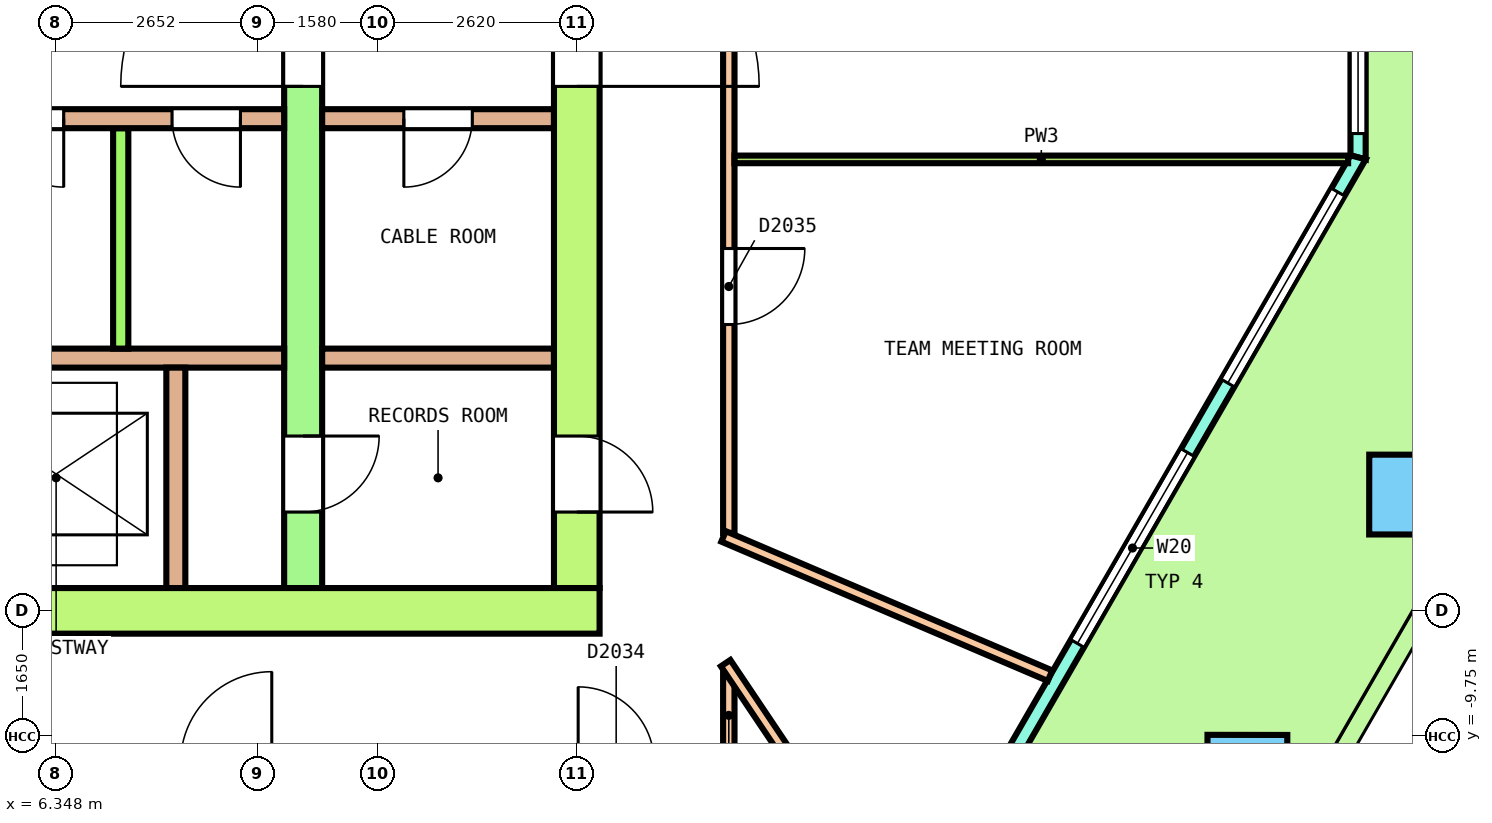
"""IFC4 building model, lengths in metres.
Left out: names, types, materials, properties, quantities, classifications, styles, units other than length and angle.
Written with IfcOpenShell. Run it as: python <this file> out.ifc"""

import sys

from ifc_helpers import new_model, si_unit, direction, frame, frame_2d, origin, origin_2d, place, context, subcontext, project, spatial, polyline, rectangle, outline, extrude, element, fill, save


model = new_model("IFC4")
c1 = context("Model", 3, precision=1e-05, world=origin(), true_north=direction((0.0, 1.0)))
c2 = subcontext(c1, "Body", "Model", "MODEL_VIEW")
j1 = project(units=[si_unit("LENGTHUNIT", "METRE"), si_unit("PLANEANGLEUNIT", "RADIAN")], contexts=[c1])
p1 = place(None, origin())
s1 = spatial("IfcSite", under=j1, at=p1, CompositionType="ELEMENT")
p2 = place(p1, origin())
s2 = spatial("IfcBuilding", under=s1, at=p2, CompositionType="ELEMENT")
p3 = place(p2, frame((0.0, 0.0, 241.4)))
s3 = spatial("IfcBuildingStorey", under=s2, at=p3, CompositionType="ELEMENT", Elevation=241.4)
p4 = place(p3, frame((22.022, -10.257, 0.0), z_axis=(0.003611703602, 0.006287039604, 0.99997371402), x_axis=(0.499382074229, 0.866351529566, -0.007250597003)))
e1 = element("IfcColumn", 1, at=p4, inside=s3, PredefinedType="COLUMN", context=c2, shape_type="SweptSolid", body=[
    extrude(rectangle(XDim=1.05, YDim=1.05, at=origin_2d()), origin(), (0.0, 0.0, 1.0), 3.65),
])
p5 = place(p3, frame((24.15, -6.57, 0.0), z_axis=(0.010899694483, 0.018857140148, 0.999762774325), x_axis=(0.501085789903, 0.865123480471, -0.021780603655)))
e2 = element("IfcColumn", 2, at=p5, inside=s3, PredefinedType="COLUMN", context=c2, shape_type="SweptSolid", body=[
    extrude(rectangle(XDim=1.05, YDim=1.05, at=origin_2d()), origin(), (0.0, 0.0, 1.0), 3.651),
])
p6 = place(p3, frame((23.479, -2.134, 0.0), z_axis=(0.0, 0.0, 1.0), x_axis=(0.0, 1.0, 0.0)))
e3 = element("IfcWall", 3, at=p6, inside=s3, PredefinedType="SOLIDWALL", context=c2, shape_type="SweptSolid", body=[
    extrude(outline(polyline([(-0.027, -0.1), (1.008, -0.1), (2.042, -0.1), (3.077, -0.1), (4.111, -0.1), (5.146, -0.1), (6.18, -0.1), (6.126, 0.1), (5.11, 0.1), (4.093, 0.1), (3.077, 0.1), (2.06, 0.1), (1.043, 0.1), (0.027, 0.1), (-0.027, -0.1)])), origin(), (0.0, 0.0, 1.0), 3.7),
])
p7 = place(p6, frame((0.313, 0.0, 0.1)))
e4 = element("IfcOpeningElement", 4, at=p7, cuts=e3, PredefinedType="OPENING", context=c2, shape_type="SweptSolid", body=[
    extrude(rectangle(XDim=2.45, YDim=2.65, at=frame_2d((1.225, 1.325))), frame((0.0, 0.11, 0.0), z_axis=(0.0, -1.0, 0.0), x_axis=(1.0, 0.0, 0.0)), (0.0, 0.0, 1.0), 0.22),
])
p8 = place(p6, frame((3.39, 0.0, 0.1)))
e5 = element("IfcOpeningElement", 5, at=p8, cuts=e3, PredefinedType="OPENING", context=c2, shape_type="SweptSolid", body=[
    extrude(rectangle(XDim=2.45, YDim=2.65, at=frame_2d((1.225, 1.325))), frame((0.0, 0.11, 0.0), z_axis=(0.0, -1.0, 0.0), x_axis=(1.0, 0.0, 0.0)), (0.0, 0.0, 1.0), 0.22),
])
p9 = place(p3, frame((13.587, -19.266, 0.0), z_axis=(0.0, 0.0, 1.0), x_axis=(0.500004117472, 0.866023026548, 0.0)))
e6 = element("IfcWall", 6, at=p9, inside=s3, PredefinedType="SOLIDWALL", context=c2, shape_type="SweptSolid", body=[
    extrude(outline(polyline([(-0.027, -0.1), (1.017, -0.1), (2.061, -0.1), (3.105, -0.1), (4.149, -0.1), (5.193, -0.1), (6.237, -0.1), (7.281, -0.1), (8.325, -0.1), (9.369, -0.1), (10.414, -0.1), (11.458, -0.1), (12.501, -0.1), (13.546, -0.1), (14.59, -0.1), (15.634, -0.1), (16.678, -0.1), (17.722, -0.1), (18.766, -0.1), (19.81, -0.1), (19.756, 0.1), (18.718, 0.1), (17.679, 0.1), (16.641, 0.1), (15.603, 0.1), (14.564, 0.1), (13.526, 0.1), (12.488, 0.1), (11.449, 0.1), (10.411, 0.1), (9.372, 0.1), (8.334, 0.1), (7.295, 0.1), (6.257, 0.1), (5.219, 0.1), (4.18, 0.1), (3.142, 0.1), (2.104, 0.1), (1.065, 0.1), (0.027, 0.1), (-0.027, -0.1)])), origin(), (0.0, 0.0, 1.0), 3.7),
])
p10 = place(p9, frame((0.528, 0.0, 0.1)))
e7 = element("IfcOpeningElement", 7, at=p10, cuts=e6, PredefinedType="OPENING", context=c2, shape_type="SweptSolid", body=[
    extrude(rectangle(XDim=2.9, YDim=2.65, at=frame_2d((1.45, 1.325))), frame((0.0, 0.11, 0.0), z_axis=(0.0, -1.0, 0.0), x_axis=(1.0, 0.0, 0.0)), (0.0, 0.0, 1.0), 0.22),
])
p11 = place(p9, frame((4.485, 0.0, 0.1)))
e8 = element("IfcOpeningElement", 8, at=p11, cuts=e6, PredefinedType="OPENING", context=c2, shape_type="SweptSolid", body=[
    extrude(rectangle(XDim=2.9, YDim=2.65, at=frame_2d((1.45, 1.325))), frame((0.0, 0.11, 0.0), z_axis=(0.0, -1.0, 0.0), x_axis=(1.0, 0.0, 0.0)), (0.0, 0.0, 1.0), 0.22),
])
p12 = place(p9, frame((8.991, 0.0, 0.0)))
e9 = element("IfcOpeningElement", 9, at=p12, cuts=e6, PredefinedType="OPENING", context=c2, shape_type="SweptSolid", body=[
    extrude(rectangle(XDim=1.8, YDim=2.4, at=frame_2d((0.9, 1.2))), frame((0.0, 0.11, 0.0), z_axis=(0.0, -1.0, 0.0), x_axis=(1.0, 0.0, 0.0)), (0.0, 0.0, 1.0), 0.22),
])
p13 = place(p9, frame((8.991, 0.0, 2.55)))
e10 = element("IfcOpeningElement", 10, at=p13, cuts=e6, PredefinedType="OPENING", context=c2, shape_type="SweptSolid", body=[
    extrude(rectangle(XDim=1.8, YDim=0.2, at=frame_2d((0.9, 0.1))), frame((0.0, 0.11, 0.0), z_axis=(0.0, -1.0, 0.0), x_axis=(1.0, 0.0, 0.0)), (0.0, 0.0, 1.0), 0.22),
])
p14 = place(p9, frame((12.398, 0.0, 0.1)))
e11 = element("IfcOpeningElement", 11, at=p14, cuts=e6, PredefinedType="OPENING", context=c2, shape_type="SweptSolid", body=[
    extrude(rectangle(XDim=2.9, YDim=2.65, at=frame_2d((1.45, 1.325))), frame((0.0, 0.11, 0.0), z_axis=(0.0, -1.0, 0.0), x_axis=(1.0, 0.0, 0.0)), (0.0, 0.0, 1.0), 0.22),
])
p15 = place(p9, frame((16.355, 0.0, 0.1)))
e12 = element("IfcOpeningElement", 12, at=p15, cuts=e6, PredefinedType="OPENING", context=c2, shape_type="SweptSolid", body=[
    extrude(rectangle(XDim=2.9, YDim=2.65, at=frame_2d((1.45, 1.325))), frame((0.0, 0.11, 0.0), z_axis=(0.0, -1.0, 0.0), x_axis=(1.0, 0.0, 0.0)), (0.0, 0.0, 1.0), 0.22),
])
p16 = place(p3, frame((-13.5, -8.1, 0.0), z_axis=(0.0, 0.0, 1.0), x_axis=(1.0, 0.0, 0.0)))
e13 = element("IfcWall", 13, at=p16, inside=s3, PredefinedType="SHEAR", context=c2, shape_type="SweptSolid", body=[
    extrude(rectangle(XDim=27.0, YDim=0.6, at=frame_2d((13.5, 0.0))), origin(), (0.0, 0.0, 1.0), 3.7),
])
p17 = place(p16, frame((15.05, 0.0, 0.0)))
e14 = element("IfcOpeningElement", 14, at=p17, cuts=e13, PredefinedType="OPENING", context=c2, shape_type="SweptSolid", body=[
    extrude(rectangle(XDim=1.2, YDim=2.1, at=frame_2d((0.6, 1.05))), frame((0.0, 0.31, 0.0), z_axis=(0.0, -1.0, 0.0), x_axis=(1.0, 0.0, 0.0)), (0.0, 0.0, 1.0), 0.62),
])
p18 = place(p3, frame((13.2, -7.8, 0.0), z_axis=(0.0, 0.0, 1.0), x_axis=(0.0, 1.0, 0.0)))
e15 = element("IfcWall", 15, at=p18, inside=s3, PredefinedType="SHEAR", context=c2, shape_type="SweptSolid", body=[
    extrude(rectangle(XDim=15.6, YDim=0.6, at=frame_2d((7.8, 0.0))), origin(), (0.0, 0.0, 1.0), 3.7),
])
p19 = place(p18, frame((6.6, 0.0, 0.0)))
e16 = element("IfcOpeningElement", 16, at=p19, cuts=e15, PredefinedType="OPENING", context=c2, shape_type="SweptSolid", body=[
    extrude(rectangle(XDim=2.4, YDim=2.1, at=frame_2d((1.2, 1.05))), frame((0.0, 0.31, 0.0), z_axis=(0.0, -1.0, 0.0), x_axis=(1.0, 0.0, 0.0)), (0.0, 0.0, 1.0), 0.62),
])
p20 = place(p18, frame((13.5, 0.0, 0.0)))
e17 = element("IfcOpeningElement", 17, at=p20, cuts=e15, PredefinedType="OPENING", context=c2, shape_type="SweptSolid", body=[
    extrude(rectangle(XDim=1.2, YDim=2.1, at=frame_2d((0.6, 1.05))), frame((0.0, 0.31, 0.0), z_axis=(0.0, -1.0, 0.0), x_axis=(1.0, 0.0, 0.0)), (0.0, 0.0, 1.0), 0.62),
])
p21 = place(p18, frame((1.0, 0.0, 0.0)))
e18 = element("IfcOpeningElement", 18, at=p21, cuts=e15, PredefinedType="OPENING", context=c2, shape_type="SweptSolid", body=[
    extrude(rectangle(XDim=1.0, YDim=2.1, at=frame_2d((0.5, 1.05))), frame((0.0, 0.31, 0.0), z_axis=(0.0, -1.0, 0.0), x_axis=(1.0, 0.0, 0.0)), (0.0, 0.0, 1.0), 0.62),
])
p22 = place(p3, frame((9.6, -7.8, 0.0), z_axis=(0.0, 0.0, 1.0), x_axis=(0.0, 1.0, 0.0)))
e19 = element("IfcWall", 19, at=p22, inside=s3, PredefinedType="SHEAR", context=c2, shape_type="SweptSolid", body=[
    extrude(rectangle(XDim=15.6, YDim=0.5, at=frame_2d((7.8, 0.0))), origin(), (0.0, 0.0, 1.0), 3.7),
])
p23 = place(p22, frame((6.6, 0.0, 0.0)))
e20 = element("IfcOpeningElement", 20, at=p23, cuts=e19, PredefinedType="OPENING", context=c2, shape_type="SweptSolid", body=[
    extrude(rectangle(XDim=2.4, YDim=2.1, at=frame_2d((1.2, 1.05))), frame((0.0, 0.26, 0.0), z_axis=(0.0, -1.0, 0.0), x_axis=(1.0, 0.0, 0.0)), (0.0, 0.0, 1.0), 0.52),
])
p24 = place(p22, frame((13.5, 0.0, 0.0)))
e21 = element("IfcOpeningElement", 21, at=p24, cuts=e19, PredefinedType="OPENING", context=c2, shape_type="SweptSolid", body=[
    extrude(rectangle(XDim=1.2, YDim=2.1, at=frame_2d((0.6, 1.05))), frame((0.0, 0.26, 0.0), z_axis=(0.0, -1.0, 0.0), x_axis=(1.0, 0.0, 0.0)), (0.0, 0.0, 1.0), 0.52),
])
p25 = place(p22, frame((1.0, 0.0, 0.0)))
e22 = element("IfcOpeningElement", 22, at=p25, cuts=e19, PredefinedType="OPENING", context=c2, shape_type="SweptSolid", body=[
    extrude(rectangle(XDim=1.0, YDim=2.1, at=frame_2d((0.5, 1.05))), frame((0.0, 0.26, 0.0), z_axis=(0.0, -1.0, 0.0), x_axis=(1.0, 0.0, 0.0)), (0.0, 0.0, 1.0), 0.52),
])
p26 = place(p3, frame((-9.35, -1.625, 0.0), z_axis=(0.0, 0.0, 1.0), x_axis=(1.0, 0.0, 0.0)))
e23 = element("IfcWall", 23, at=p26, inside=s3, PredefinedType="SOLIDWALL", context=c2, shape_type="SweptSolid", body=[
    extrude(rectangle(XDim=18.7, YDim=0.25, at=frame_2d((9.35, 0.0))), origin(), (0.0, 0.0, 1.0), 3.7),
])
p27 = place(p26, frame((7.65, 0.0, 0.0)))
e24 = element("IfcOpeningElement", 24, at=p27, cuts=e23, PredefinedType="OPENING", context=c2, shape_type="SweptSolid", body=[
    extrude(rectangle(XDim=1.1, YDim=2.1, at=frame_2d((0.55, 1.05))), frame((0.0, 0.135, 0.0), z_axis=(0.0, -1.0, 0.0), x_axis=(1.0, 0.0, 0.0)), (0.0, 0.0, 1.0), 0.27),
])
p28 = place(p26, frame((9.95, 0.0, 0.0)))
e25 = element("IfcOpeningElement", 25, at=p28, cuts=e23, PredefinedType="OPENING", context=c2, shape_type="SweptSolid", body=[
    extrude(rectangle(XDim=1.1, YDim=2.1, at=frame_2d((0.55, 1.05))), frame((0.0, 0.135, 0.0), z_axis=(0.0, -1.0, 0.0), x_axis=(1.0, 0.0, 0.0)), (0.0, 0.0, 1.0), 0.27),
])
p29 = place(p26, frame((12.4, 0.0, 0.0)))
e26 = element("IfcOpeningElement", 26, at=p29, cuts=e23, PredefinedType="OPENING", context=c2, shape_type="SweptSolid", body=[
    extrude(rectangle(XDim=1.1, YDim=2.1, at=frame_2d((0.55, 1.05))), frame((0.0, 0.135, 0.0), z_axis=(0.0, -1.0, 0.0), x_axis=(1.0, 0.0, 0.0)), (0.0, 0.0, 1.0), 0.27),
])
p30 = place(p26, frame((0.575, 0.0, 0.0)))
e27 = element("IfcOpeningElement", 27, at=p30, cuts=e23, PredefinedType="OPENING", context=c2, shape_type="SweptSolid", body=[
    extrude(rectangle(XDim=0.9, YDim=2.1, at=frame_2d((0.45, 1.05))), frame((0.0, 0.135, 0.0), z_axis=(0.0, -1.0, 0.0), x_axis=(1.0, 0.0, 0.0)), (0.0, 0.0, 1.0), 0.27),
])
p31 = place(p26, frame((2.519, 0.0, 0.0)))
e28 = element("IfcOpeningElement", 28, at=p31, cuts=e23, PredefinedType="OPENING", context=c2, shape_type="SweptSolid", body=[
    extrude(rectangle(XDim=0.9, YDim=2.1, at=frame_2d((0.45, 1.05))), frame((0.0, 0.135, 0.0), z_axis=(0.0, -1.0, 0.0), x_axis=(1.0, 0.0, 0.0)), (0.0, 0.0, 1.0), 0.27),
])
p32 = place(p26, frame((4.881, 0.0, 0.0)))
e29 = element("IfcOpeningElement", 29, at=p32, cuts=e23, PredefinedType="OPENING", context=c2, shape_type="SweptSolid", body=[
    extrude(rectangle(XDim=0.9, YDim=2.1, at=frame_2d((0.45, 1.05))), frame((0.0, 0.135, 0.0), z_axis=(0.0, -1.0, 0.0), x_axis=(1.0, 0.0, 0.0)), (0.0, 0.0, 1.0), 0.27),
])
p33 = place(p26, frame((14.9, 0.0, 0.0)))
e30 = element("IfcOpeningElement", 30, at=p33, cuts=e23, PredefinedType="OPENING", context=c2, shape_type="SweptSolid", body=[
    extrude(rectangle(XDim=0.9, YDim=2.1, at=frame_2d((0.45, 1.05))), frame((0.0, 0.135, 0.0), z_axis=(0.0, -1.0, 0.0), x_axis=(1.0, 0.0, 0.0)), (0.0, 0.0, 1.0), 0.27),
])
p34 = place(p26, frame((17.225, 0.0, 0.0)))
e31 = element("IfcOpeningElement", 31, at=p34, cuts=e23, PredefinedType="OPENING", context=c2, shape_type="SweptSolid", body=[
    extrude(rectangle(XDim=0.9, YDim=2.1, at=frame_2d((0.45, 1.05))), frame((0.0, 0.135, 0.0), z_axis=(0.0, -1.0, 0.0), x_axis=(1.0, 0.0, 0.0)), (0.0, 0.0, 1.0), 0.27),
])
p35 = place(p3, frame((9.85, -1.625, 0.0), z_axis=(0.0, 0.0, 1.0), x_axis=(1.0, 0.0, 0.0)))
e32 = element("IfcWall", 32, at=p35, inside=s3, PredefinedType="SOLIDWALL", context=c2, shape_type="SweptSolid", body=[
    extrude(rectangle(XDim=3.05, YDim=0.25, at=frame_2d((1.525, 0.0))), origin(), (0.0, 0.0, 1.0), 3.7),
])
p36 = place(p35, frame((1.075, 0.0, 0.0)))
e33 = element("IfcOpeningElement", 33, at=p36, cuts=e32, PredefinedType="OPENING", context=c2, shape_type="SweptSolid", body=[
    extrude(rectangle(XDim=0.9, YDim=2.1, at=frame_2d((0.45, 1.05))), frame((0.0, 0.135, 0.0), z_axis=(0.0, -1.0, 0.0), x_axis=(1.0, 0.0, 0.0)), (0.0, 0.0, 1.0), 0.27),
])
p37 = place(p3, frame((-9.35, -4.775, 0.0), z_axis=(0.0, 0.0, 1.0), x_axis=(1.0, 0.0, 0.0)))
e34 = element("IfcWall", 34, at=p37, inside=s3, PredefinedType="SOLIDWALL", context=c2, shape_type="SweptSolid", body=[
    extrude(rectangle(XDim=18.7, YDim=0.25, at=frame_2d((9.35, 0.0))), origin(), (0.0, 0.0, 1.0), 3.7),
])
p38 = place(p3, frame((9.85, -4.775, 0.0), z_axis=(0.0, 0.0, 1.0), x_axis=(1.0, 0.0, 0.0)))
e35 = element("IfcWall", 35, at=p38, inside=s3, PredefinedType="SOLIDWALL", context=c2, shape_type="SweptSolid", body=[
    extrude(rectangle(XDim=3.05, YDim=0.25, at=frame_2d((1.525, 0.0))), origin(), (0.0, 0.0, 1.0), 3.7),
])
p39 = place(p3, frame((7.2, -4.65, 0.0), z_axis=(0.0, 0.0, 1.0), x_axis=(0.0, 1.0, 0.0)))
e36 = element("IfcWall", 36, at=p39, inside=s3, PredefinedType="SOLIDWALL", context=c2, shape_type="SweptSolid", body=[
    extrude(rectangle(XDim=2.9, YDim=0.2, at=frame_2d((1.45, 0.0))), origin(), (0.0, 0.0, 1.0), 3.7),
])
p40 = place(p3, frame((7.925, -7.8, 0.0), z_axis=(0.0, 0.0, 1.0), x_axis=(0.0, 1.0, 0.0)))
e37 = element("IfcWall", 37, at=p40, inside=s3, PredefinedType="SOLIDWALL", context=c2, shape_type="SweptSolid", body=[
    extrude(rectangle(XDim=2.9, YDim=0.25, at=frame_2d((1.45, 0.0))), origin(), (0.0, 0.0, 1.0), 3.7),
])
p41 = place(p3, frame((15.2, -10.025, 0.0), z_axis=(0.0, 0.0, 1.0), x_axis=(0.0, 1.0, 0.0)))
e38 = element("IfcWall", 38, at=p41, inside=s3, PredefinedType="PARTITIONING", context=c2, shape_type="SweptSolid", body=[
    extrude(rectangle(XDim=1.1, YDim=0.15, at=frame_2d((0.55, 0.0))), origin(), (0.0, 0.0, 1.0), 3.7),
])
p42 = place(p3, frame((15.2, -7.075, 0.0), z_axis=(0.0, 0.0, 1.0), x_axis=(0.0, 1.0, 0.0)))
e39 = element("IfcWall", 39, at=p42, inside=s3, PredefinedType="PARTITIONING", context=c2, shape_type="SweptSolid", body=[
    extrude(rectangle(XDim=17.1, YDim=0.15, at=frame_2d((8.55, 0.0))), origin(), (0.0, 0.0, 1.0), 2.8),
])
p43 = place(p42, frame((7.418, 0.0, 0.0)))
e40 = element("IfcOpeningElement", 40, at=p43, cuts=e39, PredefinedType="OPENING", context=c2, shape_type="SweptSolid", body=[
    extrude(rectangle(XDim=1.2, YDim=2.1, at=frame_2d((0.6, 1.05))), frame((0.0, 0.085, 0.0), z_axis=(0.0, -1.0, 0.0), x_axis=(1.0, 0.0, 0.0)), (0.0, 0.0, 1.0), 0.17),
])
p44 = place(p42, frame((12.815, 0.0, 0.0)))
e41 = element("IfcOpeningElement", 41, at=p44, cuts=e39, PredefinedType="OPENING", context=c2, shape_type="SweptSolid", body=[
    extrude(rectangle(XDim=1.2, YDim=2.1, at=frame_2d((0.6, 1.05))), frame((0.0, 0.085, 0.0), z_axis=(0.0, -1.0, 0.0), x_axis=(1.0, 0.0, 0.0)), (0.0, 0.0, 1.0), 0.17),
])
p45 = place(p42, frame((2.742, 0.0, 0.0)))
e42 = element("IfcOpeningElement", 42, at=p45, cuts=e39, PredefinedType="OPENING", context=c2, shape_type="SweptSolid", body=[
    extrude(rectangle(XDim=1.0, YDim=2.1, at=frame_2d((0.5, 1.05))), frame((0.0, 0.085, 0.0), z_axis=(0.0, -1.0, 0.0), x_axis=(1.0, 0.0, 0.0)), (0.0, 0.0, 1.0), 0.17),
])
p46 = place(p3, frame((15.158, -8.788, 0.0), z_axis=(0.0, 0.0, 1.0), x_axis=(0.557200585309, -0.830377930662, 0.0)))
e43 = element("IfcWall", 43, at=p46, inside=s3, PredefinedType="PARTITIONING", context=c2, shape_type="SweptSolid", body=[
    extrude(rectangle(XDim=4.209, YDim=0.15, at=frame_2d((2.105, 0.0))), origin(), (0.0, 0.0, 1.0), 2.8),
])
p47 = place(p3, frame((15.131, -7.121, 0.0), z_axis=(0.0, 0.0, 1.0), x_axis=(0.919795529943, -0.39239799069, 0.0)))
e44 = element("IfcWall", 44, at=p47, inside=s3, PredefinedType="PARTITIONING", context=c2, shape_type="SweptSolid", body=[
    extrude(rectangle(XDim=4.669, YDim=0.15, at=frame_2d((2.335, 0.0))), origin(), (0.0, 0.0, 1.0), 2.8),
])
p48 = place(p3, frame((15.275, -2.16, 0.0), z_axis=(0.0, 0.0, 1.0), x_axis=(1.0, 0.0, 0.0)))
e45 = element("IfcWall", 45, at=p48, inside=s3, PredefinedType="PARTITIONING", context=c2, shape_type="SweptSolid", body=[
    extrude(rectangle(XDim=8.073, YDim=0.1, at=frame_2d((4.037, 0.0))), origin(), (0.0, 0.0, 1.0), 2.8),
])
p49 = place(p7, origin())
e46 = element("IfcWindow", 46, at=p49, inside=s3, PartitioningType="SINGLE_PANEL", PredefinedType="WINDOW", context=c2, shape_type="SweptSolid", body=[
    extrude(rectangle(XDim=2.45, YDim=2.65, at=frame_2d((1.225, 1.325))), frame((0.0, 0.03, 0.0), z_axis=(0.0, -1.0, 0.0), x_axis=(1.0, 0.0, 0.0)), (0.0, 0.0, 1.0), 0.06),
])
fill(e4, e46)
p50 = place(p14, origin())
e47 = element("IfcWindow", 47, at=p50, inside=s3, PartitioningType="SINGLE_PANEL", PredefinedType="WINDOW", context=c2, shape_type="SweptSolid", body=[
    extrude(rectangle(XDim=2.9, YDim=2.65, at=frame_2d((1.45, 1.325))), frame((0.0, 0.03, 0.0), z_axis=(0.0, -1.0, 0.0), x_axis=(1.0, 0.0, 0.0)), (0.0, 0.0, 1.0), 0.06),
])
fill(e11, e47)
p51 = place(p15, origin())
e48 = element("IfcWindow", 48, at=p51, inside=s3, PartitioningType="SINGLE_PANEL", PredefinedType="WINDOW", context=c2, shape_type="SweptSolid", body=[
    extrude(rectangle(XDim=2.9, YDim=2.65, at=frame_2d((1.45, 1.325))), frame((0.0, 0.03, 0.0), z_axis=(0.0, -1.0, 0.0), x_axis=(1.0, 0.0, 0.0)), (0.0, 0.0, 1.0), 0.06),
])
fill(e12, e48)
p52 = place(p23, origin())
e49 = element("IfcDoor", 49, at=p52, inside=s3, OperationType="DOUBLE_DOOR_SINGLE_SWING", PredefinedType="DOOR", context=c2, shape_type="SweptSolid", body=[
    extrude(rectangle(XDim=2.4, YDim=2.1, at=frame_2d((1.2, 1.05))), frame((0.0, 0.2, 0.0), z_axis=(0.0, -1.0, 0.0), x_axis=(1.0, 0.0, 0.0)), (0.0, 0.0, 1.0), 0.4),
])
fill(e20, e49)
p53 = place(p19, origin())
e50 = element("IfcDoor", 50, at=p53, inside=s3, OperationType="DOUBLE_DOOR_SINGLE_SWING", PredefinedType="DOOR", context=c2, shape_type="SweptSolid", body=[
    extrude(rectangle(XDim=2.4, YDim=2.1, at=frame_2d((1.2, 1.05))), frame((0.0, 0.25, 0.0), z_axis=(0.0, -1.0, 0.0), x_axis=(1.0, 0.0, 0.0)), (0.0, 0.0, 1.0), 0.5),
])
fill(e16, e50)
p54 = place(p25, origin())
e51 = element("IfcDoor", 51, at=p54, inside=s3, OperationType="SINGLE_SWING_RIGHT", PredefinedType="DOOR", context=c2, shape_type="SweptSolid", body=[
    extrude(rectangle(XDim=1.0, YDim=2.1, at=frame_2d((0.5, 1.05))), frame((0.0, 0.2, 0.0), z_axis=(0.0, -1.0, 0.0), x_axis=(1.0, 0.0, 0.0)), (0.0, 0.0, 1.0), 0.4),
])
fill(e22, e51)
p55 = place(p21, origin())
e52 = element("IfcDoor", 52, at=p55, inside=s3, OperationType="SINGLE_SWING_LEFT", PredefinedType="DOOR", context=c2, shape_type="SweptSolid", body=[
    extrude(rectangle(XDim=1.0, YDim=2.1, at=frame_2d((0.5, 1.05))), frame((0.0, 0.25, 0.0), z_axis=(0.0, -1.0, 0.0), x_axis=(1.0, 0.0, 0.0)), (0.0, 0.0, 1.0), 0.5),
])
fill(e18, e52)
p56 = place(p33, origin())
e53 = element("IfcDoor", 53, at=p56, inside=s3, OperationType="SINGLE_SWING_LEFT", PredefinedType="DOOR", context=c2, shape_type="SweptSolid", body=[
    extrude(rectangle(XDim=0.9, YDim=2.1, at=frame_2d((0.45, 1.05))), frame((0.0, 0.075, 0.0), z_axis=(0.0, -1.0, 0.0), x_axis=(1.0, 0.0, 0.0)), (0.0, 0.0, 1.0), 0.15),
])
fill(e30, e53)
p57 = place(p34, origin())
e54 = element("IfcDoor", 54, at=p57, inside=s3, OperationType="SINGLE_SWING_RIGHT", PredefinedType="DOOR", context=c2, shape_type="SweptSolid", body=[
    extrude(rectangle(XDim=0.9, YDim=2.1, at=frame_2d((0.45, 1.05))), frame((0.0, 0.075, 0.0), z_axis=(0.0, -1.0, 0.0), x_axis=(1.0, 0.0, 0.0)), (0.0, 0.0, 1.0), 0.15),
])
fill(e31, e54)
p58 = place(p36, origin())
e55 = element("IfcDoor", 55, at=p58, inside=s3, OperationType="SINGLE_SWING_LEFT", PredefinedType="DOOR", context=c2, shape_type="SweptSolid", body=[
    extrude(rectangle(XDim=0.9, YDim=2.1, at=frame_2d((0.45, 1.05))), frame((0.0, 0.075, 0.0), z_axis=(0.0, -1.0, 0.0), x_axis=(1.0, 0.0, 0.0)), (0.0, 0.0, 1.0), 0.15),
])
fill(e33, e55)
p59 = place(p45, origin())
e56 = element("IfcDoor", 56, at=p59, inside=s3, OperationType="SINGLE_SWING_RIGHT", PredefinedType="DOOR", context=c2, shape_type="SweptSolid", body=[
    extrude(rectangle(XDim=1.0, YDim=2.1, at=frame_2d((0.5, 1.05))), frame((0.0, 0.025, 0.0), z_axis=(0.0, -1.0, 0.0), x_axis=(1.0, 0.0, 0.0)), (0.0, 0.0, 1.0), 0.05),
])
fill(e42, e56)
save(model, sys.argv[1])
